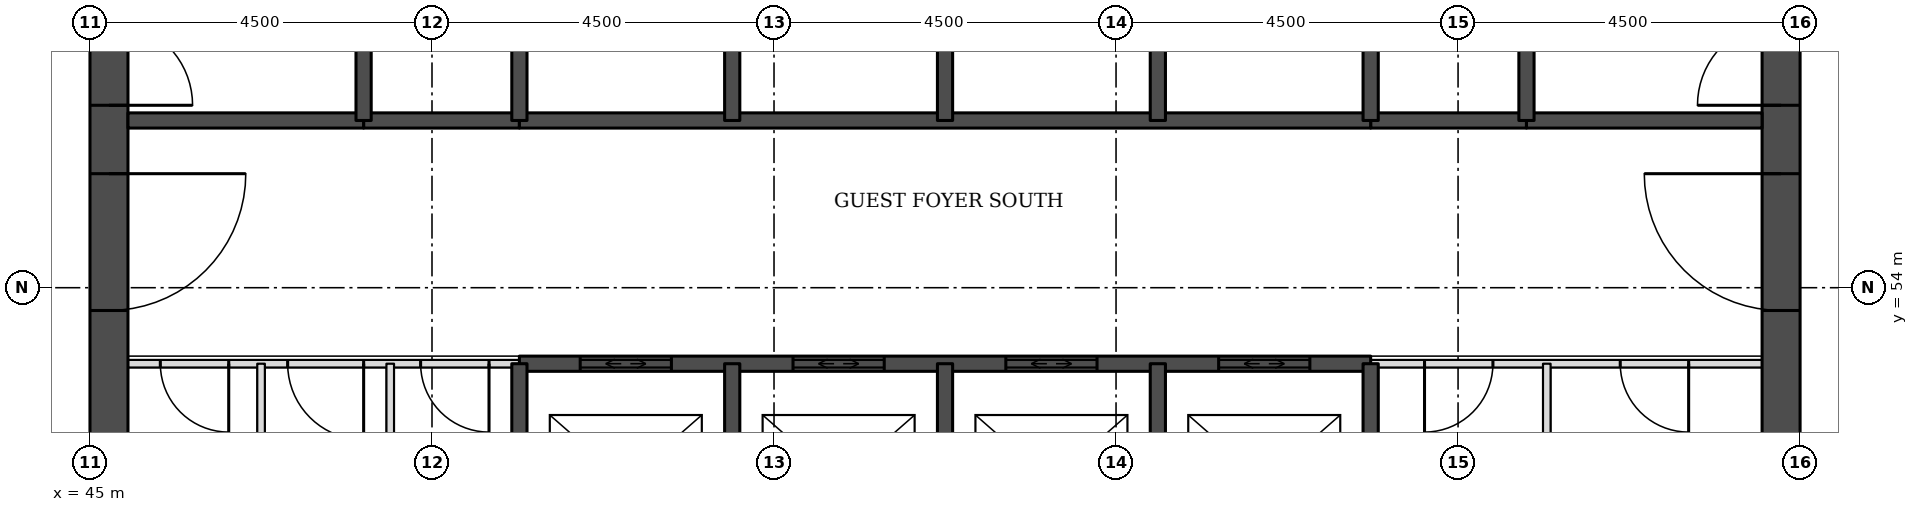
"""IFC4 building model, lengths in metres.
Left out: names, types, materials, properties, quantities, classifications, styles, units other than length and angle.
Written with IfcOpenShell. Run it as: python <this file> out.ifc"""

import sys

from ifc_helpers import new_model, si_unit, direction, frame, frame_2d, origin, place, context, subcontext, project, spatial, rectangle, extrude, element, fill, save


model = new_model("IFC4")
c1 = context("Model", 3, precision=1e-05, world=origin(), true_north=direction((0.0, 1.0)))
c2 = subcontext(c1, "Body", "Model", "MODEL_VIEW")
j1 = project(units=[si_unit("LENGTHUNIT", "METRE"), si_unit("PLANEANGLEUNIT", "RADIAN")], contexts=[c1])
p1 = place(None, origin())
s1 = spatial("IfcSite", under=j1, at=p1, CompositionType="ELEMENT")
p2 = place(p1, origin())
s2 = spatial("IfcBuilding", under=s1, at=p2, CompositionType="ELEMENT")
p3 = place(p2, frame((0.0, 0.0, 52.8)))
s3 = spatial("IfcBuildingStorey", under=s2, at=p3, CompositionType="ELEMENT", Elevation=52.8)
p4 = place(p3, frame((45.25, 49.5, 0.0), z_axis=(0.0, 0.0, 1.0), x_axis=(0.0, 1.0, 0.0)))
e1 = element("IfcWall", 1, at=p4, inside=s3, PredefinedType="SHEAR", context=c2, shape_type="SweptSolid", body=[
    extrude(rectangle(XDim=22.5, YDim=0.5, at=frame_2d((11.25, 0.0))), origin(), (0.0, 0.0, 1.0), 3.3),
])
p5 = place(p4, frame((4.2, 0.0, 0.0)))
e2 = element("IfcOpeningElement", 2, at=p5, cuts=e1, PredefinedType="OPENING", context=c2, shape_type="SweptSolid", body=[
    extrude(rectangle(XDim=1.8, YDim=2.1, at=frame_2d((0.9, 1.05))), frame((0.0, 0.26, 0.0), z_axis=(0.0, -1.0, 0.0), x_axis=(1.0, 0.0, 0.0)), (0.0, 0.0, 1.0), 0.52),
])
p6 = place(p4, frame((6.9, 0.0, 0.0)))
e3 = element("IfcOpeningElement", 3, at=p6, cuts=e1, PredefinedType="OPENING", context=c2, shape_type="SweptSolid", body=[
    extrude(rectangle(XDim=1.1, YDim=2.1, at=frame_2d((0.55, 1.05))), frame((0.0, 0.26, 0.0), z_axis=(0.0, -1.0, 0.0), x_axis=(1.0, 0.0, 0.0)), (0.0, 0.0, 1.0), 0.52),
])
p7 = place(p4, frame((13.6, 0.0, 0.0)))
e4 = element("IfcOpeningElement", 4, at=p7, cuts=e1, PredefinedType="OPENING", context=c2, shape_type="SweptSolid", body=[
    extrude(rectangle(XDim=1.1, YDim=2.1, at=frame_2d((0.55, 1.05))), frame((0.0, 0.26, 0.0), z_axis=(0.0, -1.0, 0.0), x_axis=(1.0, 0.0, 0.0)), (0.0, 0.0, 1.0), 0.52),
])
p8 = place(p4, frame((16.5, 0.0, 0.0)))
e5 = element("IfcOpeningElement", 5, at=p8, cuts=e1, PredefinedType="OPENING", context=c2, shape_type="SweptSolid", body=[
    extrude(rectangle(XDim=1.8, YDim=2.1, at=frame_2d((0.9, 1.05))), frame((0.0, 0.26, 0.0), z_axis=(0.0, -1.0, 0.0), x_axis=(1.0, 0.0, 0.0)), (0.0, 0.0, 1.0), 0.52),
])
p9 = place(p3, frame((67.25, 49.5, 0.0), z_axis=(0.0, 0.0, 1.0), x_axis=(0.0, 1.0, 0.0)))
e6 = element("IfcWall", 6, at=p9, inside=s3, PredefinedType="SHEAR", context=c2, shape_type="SweptSolid", body=[
    extrude(rectangle(XDim=22.5, YDim=0.5, at=frame_2d((11.25, 0.0))), origin(), (0.0, 0.0, 1.0), 3.3),
])
p10 = place(p9, frame((4.2, 0.0, 0.0)))
e7 = element("IfcOpeningElement", 7, at=p10, cuts=e6, PredefinedType="OPENING", context=c2, shape_type="SweptSolid", body=[
    extrude(rectangle(XDim=1.8, YDim=2.1, at=frame_2d((0.9, 1.05))), frame((0.0, 0.26, 0.0), z_axis=(0.0, -1.0, 0.0), x_axis=(1.0, 0.0, 0.0)), (0.0, 0.0, 1.0), 0.52),
])
p11 = place(p9, frame((6.9, 0.0, 0.0)))
e8 = element("IfcOpeningElement", 8, at=p11, cuts=e6, PredefinedType="OPENING", context=c2, shape_type="SweptSolid", body=[
    extrude(rectangle(XDim=1.1, YDim=2.1, at=frame_2d((0.55, 1.05))), frame((0.0, 0.26, 0.0), z_axis=(0.0, -1.0, 0.0), x_axis=(1.0, 0.0, 0.0)), (0.0, 0.0, 1.0), 0.52),
])
p12 = place(p9, frame((13.6, 0.0, 0.0)))
e9 = element("IfcOpeningElement", 9, at=p12, cuts=e6, PredefinedType="OPENING", context=c2, shape_type="SweptSolid", body=[
    extrude(rectangle(XDim=1.1, YDim=2.1, at=frame_2d((0.55, 1.05))), frame((0.0, 0.26, 0.0), z_axis=(0.0, -1.0, 0.0), x_axis=(1.0, 0.0, 0.0)), (0.0, 0.0, 1.0), 0.52),
])
p13 = place(p9, frame((16.5, 0.0, 0.0)))
e10 = element("IfcOpeningElement", 10, at=p13, cuts=e6, PredefinedType="OPENING", context=c2, shape_type="SweptSolid", body=[
    extrude(rectangle(XDim=1.8, YDim=2.1, at=frame_2d((0.9, 1.05))), frame((0.0, 0.26, 0.0), z_axis=(0.0, -1.0, 0.0), x_axis=(1.0, 0.0, 0.0)), (0.0, 0.0, 1.0), 0.52),
])
p14 = place(p3, frame((45.5, 53.0, 0.0), z_axis=(0.0, 0.0, 1.0), x_axis=(1.0, 0.0, 0.0)))
e11 = element("IfcWall", 11, at=p14, inside=s3, PredefinedType="PARTITIONING", context=c2, shape_type="SweptSolid", body=[
    extrude(rectangle(XDim=5.15, YDim=0.1, at=frame_2d((2.575, 0.0))), origin(), (0.0, 0.0, 1.0), 3.08),
])
p15 = place(p14, frame((0.426, 0.0, 0.0)))
e12 = element("IfcOpeningElement", 12, at=p15, cuts=e11, PredefinedType="OPENING", context=c2, shape_type="SweptSolid", body=[
    extrude(rectangle(XDim=0.9, YDim=2.1, at=frame_2d((0.45, 1.05))), frame((0.0, 0.06, 0.0), z_axis=(0.0, -1.0, 0.0), x_axis=(1.0, 0.0, 0.0)), (0.0, 0.0, 1.0), 0.12),
])
p16 = place(p14, frame((2.101, 0.0, 0.0)))
e13 = element("IfcOpeningElement", 13, at=p16, cuts=e11, PredefinedType="OPENING", context=c2, shape_type="SweptSolid", body=[
    extrude(rectangle(XDim=1.0, YDim=2.1, at=frame_2d((0.5, 1.05))), frame((0.0, 0.06, 0.0), z_axis=(0.0, -1.0, 0.0), x_axis=(1.0, 0.0, 0.0)), (0.0, 0.0, 1.0), 0.12),
])
p17 = place(p14, frame((3.85, 0.0, 0.0)))
e14 = element("IfcOpeningElement", 14, at=p17, cuts=e11, PredefinedType="OPENING", context=c2, shape_type="SweptSolid", body=[
    extrude(rectangle(XDim=0.9, YDim=2.1, at=frame_2d((0.45, 1.05))), frame((0.0, 0.06, 0.0), z_axis=(0.0, -1.0, 0.0), x_axis=(1.0, 0.0, 0.0)), (0.0, 0.0, 1.0), 0.12),
])
p18 = place(p3, frame((61.85, 53.0, 0.0), z_axis=(0.0, 0.0, 1.0), x_axis=(1.0, 0.0, 0.0)))
e15 = element("IfcWall", 15, at=p18, inside=s3, PredefinedType="PARTITIONING", context=c2, shape_type="SweptSolid", body=[
    extrude(rectangle(XDim=5.15, YDim=0.1, at=frame_2d((2.575, 0.0))), origin(), (0.0, 0.0, 1.0), 3.08),
])
p19 = place(p18, frame((3.284, 0.0, 0.0)))
e16 = element("IfcOpeningElement", 16, at=p19, cuts=e15, PredefinedType="OPENING", context=c2, shape_type="SweptSolid", body=[
    extrude(rectangle(XDim=0.9, YDim=2.1, at=frame_2d((0.45, 1.05))), frame((0.0, 0.06, 0.0), z_axis=(0.0, -1.0, 0.0), x_axis=(1.0, 0.0, 0.0)), (0.0, 0.0, 1.0), 0.12),
])
p20 = place(p18, frame((0.709, 0.0, 0.0)))
e17 = element("IfcOpeningElement", 17, at=p20, cuts=e15, PredefinedType="OPENING", context=c2, shape_type="SweptSolid", body=[
    extrude(rectangle(XDim=0.9, YDim=2.1, at=frame_2d((0.45, 1.05))), frame((0.0, 0.06, 0.0), z_axis=(0.0, -1.0, 0.0), x_axis=(1.0, 0.0, 0.0)), (0.0, 0.0, 1.0), 0.12),
])
p21 = place(p3, frame((50.65, 53.0, 0.0), z_axis=(0.0, 0.0, 1.0), x_axis=(1.0, 0.0, 0.0)))
e18 = element("IfcWall", 18, at=p21, inside=s3, PredefinedType="SOLIDWALL", context=c2, shape_type="SweptSolid", body=[
    extrude(rectangle(XDim=11.2, YDim=0.2, at=frame_2d((5.6, 0.0))), origin(), (0.0, 0.0, 1.0), 3.08),
])
p22 = place(p21, frame((0.8, 0.0, 0.0)))
e19 = element("IfcOpeningElement", 19, at=p22, cuts=e18, PredefinedType="OPENING", context=c2, shape_type="SweptSolid", body=[
    extrude(rectangle(XDim=1.2, YDim=2.1, at=frame_2d((0.6, 1.05))), frame((0.0, 0.11, 0.0), z_axis=(0.0, -1.0, 0.0), x_axis=(1.0, 0.0, 0.0)), (0.0, 0.0, 1.0), 0.22),
])
p23 = place(p21, frame((3.6, 0.0, 0.0)))
e20 = element("IfcOpeningElement", 20, at=p23, cuts=e18, PredefinedType="OPENING", context=c2, shape_type="SweptSolid", body=[
    extrude(rectangle(XDim=1.2, YDim=2.1, at=frame_2d((0.6, 1.05))), frame((0.0, 0.11, 0.0), z_axis=(0.0, -1.0, 0.0), x_axis=(1.0, 0.0, 0.0)), (0.0, 0.0, 1.0), 0.22),
])
p24 = place(p21, frame((6.4, 0.0, 0.0)))
e21 = element("IfcOpeningElement", 21, at=p24, cuts=e18, PredefinedType="OPENING", context=c2, shape_type="SweptSolid", body=[
    extrude(rectangle(XDim=1.2, YDim=2.1, at=frame_2d((0.6, 1.05))), frame((0.0, 0.11, 0.0), z_axis=(0.0, -1.0, 0.0), x_axis=(1.0, 0.0, 0.0)), (0.0, 0.0, 1.0), 0.22),
])
p25 = place(p21, frame((9.2, 0.0, 0.0)))
e22 = element("IfcOpeningElement", 22, at=p25, cuts=e18, PredefinedType="OPENING", context=c2, shape_type="SweptSolid", body=[
    extrude(rectangle(XDim=1.2, YDim=2.1, at=frame_2d((0.6, 1.05))), frame((0.0, 0.11, 0.0), z_axis=(0.0, -1.0, 0.0), x_axis=(1.0, 0.0, 0.0)), (0.0, 0.0, 1.0), 0.22),
])
for number, where, z_axis, x_axis in (
    (23, (48.6, 56.2, 0.0), (0.0, 0.0, 1.0), (1.0, 0.0, 0.0)),
    (24, (61.85, 56.2, 0.0), (0.0, 0.0, 1.0), (1.0, 0.0, 0.0)),
):
    element("IfcWall", number, at=place(p3, frame(where, z_axis=z_axis, x_axis=x_axis)), inside=s3, PredefinedType="SOLIDWALL", context=c2, shape_type="SweptSolid", body=[
        extrude(rectangle(XDim=2.05, YDim=0.2, at=frame_2d((1.025, 0.0))), origin(), (0.0, 0.0, 1.0), 3.08),
    ])
p26 = place(p3, frame((45.5, 56.2, 0.0), z_axis=(0.0, 0.0, 1.0), x_axis=(1.0, 0.0, 0.0)))
e25 = element("IfcWall", 25, at=p26, inside=s3, PredefinedType="SOLIDWALL", context=c2, shape_type="SweptSolid", body=[
    extrude(rectangle(XDim=3.1, YDim=0.2, at=frame_2d((1.55, 0.0))), origin(), (0.0, 0.0, 1.0), 3.08),
])
p27 = place(p3, frame((50.65, 56.2, 0.0), z_axis=(0.0, 0.0, 1.0), x_axis=(1.0, 0.0, 0.0)))
e26 = element("IfcWall", 26, at=p27, inside=s3, PredefinedType="SOLIDWALL", context=c2, shape_type="SweptSolid", body=[
    extrude(rectangle(XDim=11.2, YDim=0.2, at=frame_2d((5.6, 0.0))), origin(), (0.0, 0.0, 1.0), 3.08),
])
p28 = place(p3, frame((63.9, 56.2, 0.0), z_axis=(0.0, 0.0, 1.0), x_axis=(1.0, 0.0, 0.0)))
e27 = element("IfcWall", 27, at=p28, inside=s3, PredefinedType="SOLIDWALL", context=c2, shape_type="SweptSolid", body=[
    extrude(rectangle(XDim=3.1, YDim=0.2, at=frame_2d((1.55, 0.0))), origin(), (0.0, 0.0, 1.0), 3.08),
])
p29 = place(p3, frame((47.251, 50.0, 0.0), z_axis=(0.0, 0.0, 1.0), x_axis=(0.0, 1.0, 0.0)))
e28 = element("IfcWall", 28, at=p29, inside=s3, PredefinedType="PARTITIONING", context=c2, shape_type="SweptSolid", body=[
    extrude(rectangle(XDim=3.0, YDim=0.1, at=frame_2d((1.5, 0.0))), origin(), (0.0, 0.0, 1.0), 3.08),
])
p30 = place(p3, frame((48.6, 56.2, 0.0), z_axis=(0.0, 0.0, 1.0), x_axis=(0.0, 1.0, 0.0)))
e29 = element("IfcWall", 29, at=p30, inside=s3, PredefinedType="SOLIDWALL", context=c2, shape_type="SweptSolid", body=[
    extrude(rectangle(XDim=5.8, YDim=0.2, at=frame_2d((2.9, 0.0))), origin(), (0.0, 0.0, 1.0), 3.08),
])
p31 = place(p3, frame((48.95, 50.0, 0.0), z_axis=(0.0, 0.0, 1.0), x_axis=(0.0, 1.0, 0.0)))
e30 = element("IfcWall", 30, at=p31, inside=s3, PredefinedType="PARTITIONING", context=c2, shape_type="SweptSolid", body=[
    extrude(rectangle(XDim=3.0, YDim=0.1, at=frame_2d((1.5, 0.0))), origin(), (0.0, 0.0, 1.0), 3.08),
])
p32 = place(p3, frame((50.65, 50.0, 0.0), z_axis=(0.0, 0.0, 1.0), x_axis=(0.0, 1.0, 0.0)))
e31 = element("IfcWall", 31, at=p32, inside=s3, PredefinedType="SOLIDWALL", context=c2, shape_type="SweptSolid", body=[
    extrude(rectangle(XDim=3.0, YDim=0.2, at=frame_2d((1.5, 0.0))), origin(), (0.0, 0.0, 1.0), 3.08),
])
p33 = place(p3, frame((50.65, 56.2, 0.0), z_axis=(0.0, 0.0, 1.0), x_axis=(0.0, 1.0, 0.0)))
e32 = element("IfcWall", 32, at=p33, inside=s3, PredefinedType="SOLIDWALL", context=c2, shape_type="SweptSolid", body=[
    extrude(rectangle(XDim=2.8, YDim=0.2, at=frame_2d((1.4, 0.0))), origin(), (0.0, 0.0, 1.0), 3.08),
])
p34 = place(p3, frame((53.45, 50.0, 0.0), z_axis=(0.0, 0.0, 1.0), x_axis=(0.0, 1.0, 0.0)))
e33 = element("IfcWall", 33, at=p34, inside=s3, PredefinedType="SOLIDWALL", context=c2, shape_type="SweptSolid", body=[
    extrude(rectangle(XDim=3.0, YDim=0.2, at=frame_2d((1.5, 0.0))), origin(), (0.0, 0.0, 1.0), 3.08),
])
p35 = place(p3, frame((53.45, 56.2, 0.0), z_axis=(0.0, 0.0, 1.0), x_axis=(0.0, 1.0, 0.0)))
e34 = element("IfcWall", 34, at=p35, inside=s3, PredefinedType="SOLIDWALL", context=c2, shape_type="SweptSolid", body=[
    extrude(rectangle(XDim=2.8, YDim=0.2, at=frame_2d((1.4, 0.0))), origin(), (0.0, 0.0, 1.0), 3.08),
])
p36 = place(p3, frame((56.25, 50.0, 0.0), z_axis=(0.0, 0.0, 1.0), x_axis=(0.0, 1.0, 0.0)))
e35 = element("IfcWall", 35, at=p36, inside=s3, PredefinedType="SOLIDWALL", context=c2, shape_type="SweptSolid", body=[
    extrude(rectangle(XDim=3.0, YDim=0.2, at=frame_2d((1.5, 0.0))), origin(), (0.0, 0.0, 1.0), 3.08),
])
p37 = place(p3, frame((56.25, 56.2, 0.0), z_axis=(0.0, 0.0, 1.0), x_axis=(0.0, 1.0, 0.0)))
e36 = element("IfcWall", 36, at=p37, inside=s3, PredefinedType="SOLIDWALL", context=c2, shape_type="SweptSolid", body=[
    extrude(rectangle(XDim=2.8, YDim=0.2, at=frame_2d((1.4, 0.0))), origin(), (0.0, 0.0, 1.0), 3.08),
])
p38 = place(p3, frame((59.05, 50.0, 0.0), z_axis=(0.0, 0.0, 1.0), x_axis=(0.0, 1.0, 0.0)))
e37 = element("IfcWall", 37, at=p38, inside=s3, PredefinedType="SOLIDWALL", context=c2, shape_type="SweptSolid", body=[
    extrude(rectangle(XDim=3.0, YDim=0.2, at=frame_2d((1.5, 0.0))), origin(), (0.0, 0.0, 1.0), 3.08),
])
p39 = place(p3, frame((59.05, 56.2, 0.0), z_axis=(0.0, 0.0, 1.0), x_axis=(0.0, 1.0, 0.0)))
e38 = element("IfcWall", 38, at=p39, inside=s3, PredefinedType="SOLIDWALL", context=c2, shape_type="SweptSolid", body=[
    extrude(rectangle(XDim=2.8, YDim=0.2, at=frame_2d((1.4, 0.0))), origin(), (0.0, 0.0, 1.0), 3.08),
])
p40 = place(p3, frame((61.85, 50.0, 0.0), z_axis=(0.0, 0.0, 1.0), x_axis=(0.0, 1.0, 0.0)))
e39 = element("IfcWall", 39, at=p40, inside=s3, PredefinedType="SOLIDWALL", context=c2, shape_type="SweptSolid", body=[
    extrude(rectangle(XDim=3.0, YDim=0.2, at=frame_2d((1.5, 0.0))), origin(), (0.0, 0.0, 1.0), 3.08),
])
p41 = place(p3, frame((61.85, 56.2, 0.0), z_axis=(0.0, 0.0, 1.0), x_axis=(0.0, 1.0, 0.0)))
e40 = element("IfcWall", 40, at=p41, inside=s3, PredefinedType="SOLIDWALL", context=c2, shape_type="SweptSolid", body=[
    extrude(rectangle(XDim=2.8, YDim=0.2, at=frame_2d((1.4, 0.0))), origin(), (0.0, 0.0, 1.0), 3.08),
])
p42 = place(p3, frame((63.9, 56.2, 0.0), z_axis=(0.0, 0.0, 1.0), x_axis=(0.0, 1.0, 0.0)))
e41 = element("IfcWall", 41, at=p42, inside=s3, PredefinedType="SOLIDWALL", context=c2, shape_type="SweptSolid", body=[
    extrude(rectangle(XDim=5.8, YDim=0.2, at=frame_2d((2.9, 0.0))), origin(), (0.0, 0.0, 1.0), 3.08),
])
p43 = place(p3, frame((64.167, 50.0, 0.0), z_axis=(0.0, 0.0, 1.0), x_axis=(0.0, 1.0, 0.0)))
e42 = element("IfcWall", 42, at=p43, inside=s3, PredefinedType="PARTITIONING", context=c2, shape_type="SweptSolid", body=[
    extrude(rectangle(XDim=3.0, YDim=0.1, at=frame_2d((1.5, 0.0))), origin(), (0.0, 0.0, 1.0), 3.08),
])
p44 = place(p22, origin())
e43 = element("IfcDoor", 43, at=p44, inside=s3, OperationType="DOUBLE_DOOR_SLIDING", PredefinedType="DOOR", context=c2, shape_type="SweptSolid", body=[
    extrude(rectangle(XDim=1.2, YDim=2.1, at=frame_2d((0.6, 1.05))), frame((0.0, 0.025, 0.0), z_axis=(0.0, -1.0, 0.0), x_axis=(1.0, 0.0, 0.0)), (0.0, 0.0, 1.0), 0.05),
])
fill(e19, e43)
p45 = place(p23, origin())
e44 = element("IfcDoor", 44, at=p45, inside=s3, OperationType="DOUBLE_DOOR_SLIDING", PredefinedType="DOOR", context=c2, shape_type="SweptSolid", body=[
    extrude(rectangle(XDim=1.2, YDim=2.1, at=frame_2d((0.6, 1.05))), frame((0.0, 0.025, 0.0), z_axis=(0.0, -1.0, 0.0), x_axis=(1.0, 0.0, 0.0)), (0.0, 0.0, 1.0), 0.05),
])
fill(e20, e44)
p46 = place(p24, origin())
e45 = element("IfcDoor", 45, at=p46, inside=s3, OperationType="DOUBLE_DOOR_SLIDING", PredefinedType="DOOR", context=c2, shape_type="SweptSolid", body=[
    extrude(rectangle(XDim=1.2, YDim=2.1, at=frame_2d((0.6, 1.05))), frame((0.0, 0.025, 0.0), z_axis=(0.0, -1.0, 0.0), x_axis=(1.0, 0.0, 0.0)), (0.0, 0.0, 1.0), 0.05),
])
fill(e21, e45)
p47 = place(p25, origin())
e46 = element("IfcDoor", 46, at=p47, inside=s3, OperationType="DOUBLE_DOOR_SLIDING", PredefinedType="DOOR", context=c2, shape_type="SweptSolid", body=[
    extrude(rectangle(XDim=1.2, YDim=2.1, at=frame_2d((0.6, 1.05))), frame((0.0, 0.025, 0.0), z_axis=(0.0, -1.0, 0.0), x_axis=(1.0, 0.0, 0.0)), (0.0, 0.0, 1.0), 0.05),
])
fill(e22, e46)
p48 = place(p5, frame((1.8, 0.0, 0.0), z_axis=(0.0, 0.0, 1.0), x_axis=(-1.0, 0.0, 0.0)))
e47 = element("IfcDoor", 47, at=p48, inside=s3, OperationType="SINGLE_SWING_LEFT", PredefinedType="DOOR", context=c2, shape_type="SweptSolid", body=[
    extrude(rectangle(XDim=1.8, YDim=2.1, at=frame_2d((0.9, 1.05))), frame((0.0, 0.025, 0.0), z_axis=(0.0, -1.0, 0.0), x_axis=(1.0, 0.0, 0.0)), (0.0, 0.0, 1.0), 0.05),
])
fill(e2, e47)
p49 = place(p6, frame((1.1, 0.0, 0.0), z_axis=(0.0, 0.0, 1.0), x_axis=(-1.0, 0.0, 0.0)))
e48 = element("IfcDoor", 48, at=p49, inside=s3, OperationType="SINGLE_SWING_RIGHT", PredefinedType="DOOR", context=c2, shape_type="SweptSolid", body=[
    extrude(rectangle(XDim=1.1, YDim=2.1, at=frame_2d((0.55, 1.05))), frame((0.0, 0.025, 0.0), z_axis=(0.0, -1.0, 0.0), x_axis=(1.0, 0.0, 0.0)), (0.0, 0.0, 1.0), 0.05),
])
fill(e3, e48)
p50 = place(p10, origin())
e49 = element("IfcDoor", 49, at=p50, inside=s3, OperationType="SINGLE_SWING_RIGHT", PredefinedType="DOOR", context=c2, shape_type="SweptSolid", body=[
    extrude(rectangle(XDim=1.8, YDim=2.1, at=frame_2d((0.9, 1.05))), frame((0.0, 0.025, 0.0), z_axis=(0.0, -1.0, 0.0), x_axis=(1.0, 0.0, 0.0)), (0.0, 0.0, 1.0), 0.05),
])
fill(e7, e49)
p51 = place(p11, origin())
e50 = element("IfcDoor", 50, at=p51, inside=s3, OperationType="SINGLE_SWING_LEFT", PredefinedType="DOOR", context=c2, shape_type="SweptSolid", body=[
    extrude(rectangle(XDim=1.1, YDim=2.1, at=frame_2d((0.55, 1.05))), frame((0.0, 0.025, 0.0), z_axis=(0.0, -1.0, 0.0), x_axis=(1.0, 0.0, 0.0)), (0.0, 0.0, 1.0), 0.05),
])
fill(e8, e50)
p52 = place(p19, frame((0.9, 0.0, 0.0), z_axis=(0.0, 0.0, 1.0), x_axis=(-1.0, 0.0, 0.0)))
e51 = element("IfcDoor", 51, at=p52, inside=s3, OperationType="SINGLE_SWING_LEFT", PredefinedType="DOOR", context=c2, shape_type="SweptSolid", body=[
    extrude(rectangle(XDim=0.9, YDim=2.1, at=frame_2d((0.45, 1.05))), frame((0.0, 0.025, 0.0), z_axis=(0.0, -1.0, 0.0), x_axis=(1.0, 0.0, 0.0)), (0.0, 0.0, 1.0), 0.05),
])
fill(e16, e51)
p53 = place(p20, frame((0.9, 0.0, 0.0), z_axis=(0.0, 0.0, 1.0), x_axis=(-1.0, 0.0, 0.0)))
e52 = element("IfcDoor", 52, at=p53, inside=s3, OperationType="SINGLE_SWING_RIGHT", PredefinedType="DOOR", context=c2, shape_type="SweptSolid", body=[
    extrude(rectangle(XDim=0.9, YDim=2.1, at=frame_2d((0.45, 1.05))), frame((0.0, 0.025, 0.0), z_axis=(0.0, -1.0, 0.0), x_axis=(1.0, 0.0, 0.0)), (0.0, 0.0, 1.0), 0.05),
])
fill(e17, e52)
p54 = place(p15, frame((0.9, 0.0, 0.0), z_axis=(0.0, 0.0, 1.0), x_axis=(-1.0, 0.0, 0.0)))
e53 = element("IfcDoor", 53, at=p54, inside=s3, OperationType="SINGLE_SWING_LEFT", PredefinedType="DOOR", context=c2, shape_type="SweptSolid", body=[
    extrude(rectangle(XDim=0.9, YDim=2.1, at=frame_2d((0.45, 1.05))), frame((0.0, 0.025, 0.0), z_axis=(0.0, -1.0, 0.0), x_axis=(1.0, 0.0, 0.0)), (0.0, 0.0, 1.0), 0.05),
])
fill(e12, e53)
p55 = place(p16, frame((1.0, 0.0, 0.0), z_axis=(0.0, 0.0, 1.0), x_axis=(-1.0, 0.0, 0.0)))
e54 = element("IfcDoor", 54, at=p55, inside=s3, OperationType="SINGLE_SWING_LEFT", PredefinedType="DOOR", context=c2, shape_type="SweptSolid", body=[
    extrude(rectangle(XDim=1.0, YDim=2.1, at=frame_2d((0.5, 1.05))), frame((0.0, 0.025, 0.0), z_axis=(0.0, -1.0, 0.0), x_axis=(1.0, 0.0, 0.0)), (0.0, 0.0, 1.0), 0.05),
])
fill(e13, e54)
p56 = place(p17, frame((0.9, 0.0, 0.0), z_axis=(0.0, 0.0, 1.0), x_axis=(-1.0, 0.0, 0.0)))
e55 = element("IfcDoor", 55, at=p56, inside=s3, OperationType="SINGLE_SWING_LEFT", PredefinedType="DOOR", context=c2, shape_type="SweptSolid", body=[
    extrude(rectangle(XDim=0.9, YDim=2.1, at=frame_2d((0.45, 1.05))), frame((0.0, 0.025, 0.0), z_axis=(0.0, -1.0, 0.0), x_axis=(1.0, 0.0, 0.0)), (0.0, 0.0, 1.0), 0.05),
])
fill(e14, e55)
save(model, sys.argv[1])
